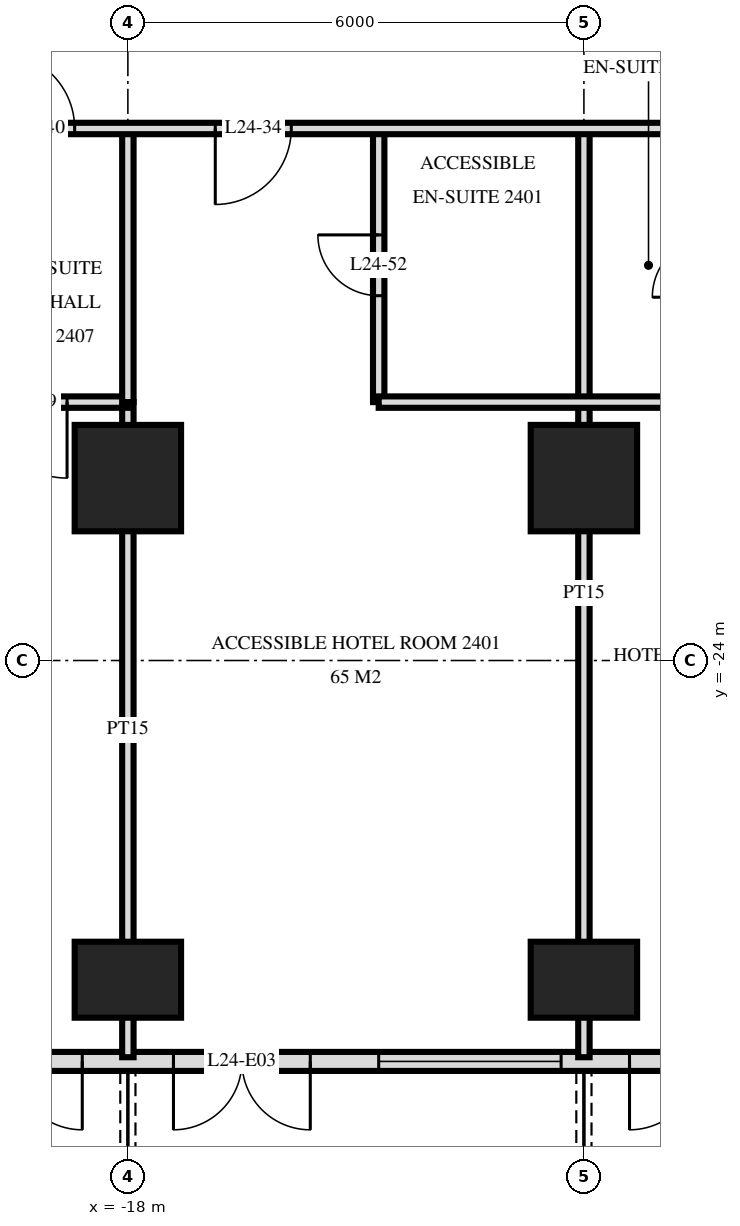
"""IFC4 building model, lengths in metres.
Left out: names, types, materials, properties, quantities, classifications, styles, units other than length and angle.
Written with IfcOpenShell. Run it as: python <this file> out.ifc"""

import sys

from ifc_helpers import new_model, si_unit, direction, frame, frame_2d, origin, origin_2d, place, context, subcontext, project, spatial, rectangle, extrude, element, fill, save


model = new_model("IFC4")
c1 = context("Model", 3, precision=1e-05, world=origin(), true_north=direction((0.0, 1.0)))
c2 = subcontext(c1, "Body", "Model", "MODEL_VIEW")
j1 = project(units=[si_unit("LENGTHUNIT", "METRE"), si_unit("PLANEANGLEUNIT", "RADIAN")], contexts=[c1])
p1 = place(None, origin())
s1 = spatial("IfcSite", under=j1, at=p1, CompositionType="ELEMENT")
p2 = place(p1, origin())
s2 = spatial("IfcBuilding", under=s1, at=p2, CompositionType="ELEMENT")
p3 = place(p2, frame((0.0, 0.0, 96.0)))
s3 = spatial("IfcBuildingStorey", under=s2, at=p3, CompositionType="ELEMENT", Elevation=96.0)
p4 = place(p3, frame((-18.0, -28.2, 0.0), z_axis=(0.0, 0.0, 1.0), x_axis=(1.0, 0.0, 0.0)))
e1 = element("IfcColumn", 1, at=p4, inside=s3, PredefinedType="COLUMN", context=c2, shape_type="SweptSolid", body=[
    extrude(rectangle(XDim=1.4, YDim=1.0, at=origin_2d()), origin(), (0.0, 0.0, 1.0), 3.6),
])
p5 = place(p3, frame((-18.0, -21.6, 0.0), z_axis=(0.0, 0.0, 1.0), x_axis=(1.0, 0.0, 0.0)))
e2 = element("IfcColumn", 2, at=p5, inside=s3, PredefinedType="COLUMN", context=c2, shape_type="SweptSolid", body=[
    extrude(rectangle(XDim=1.4, YDim=1.4, at=origin_2d()), origin(), (0.0, 0.0, 1.0), 3.6),
])
p6 = place(p3, frame((-12.0, -28.2, 0.0), z_axis=(0.0, 0.0, 1.0), x_axis=(1.0, 0.0, 0.0)))
e3 = element("IfcColumn", 3, at=p6, inside=s3, PredefinedType="COLUMN", context=c2, shape_type="SweptSolid", body=[
    extrude(rectangle(XDim=1.4, YDim=1.0, at=origin_2d()), origin(), (0.0, 0.0, 1.0), 3.6),
])
p7 = place(p3, frame((-12.0, -21.6, 0.0), z_axis=(0.0, 0.0, 1.0), x_axis=(1.0, 0.0, 0.0)))
e4 = element("IfcColumn", 4, at=p7, inside=s3, PredefinedType="COLUMN", context=c2, shape_type="SweptSolid", body=[
    extrude(rectangle(XDim=1.4, YDim=1.4, at=origin_2d()), origin(), (0.0, 0.0, 1.0), 3.6),
])
p8 = place(p3, frame((-28.775, -29.275, 0.0), z_axis=(0.0, 0.0, 1.0), x_axis=(1.0, 0.0, 0.0)))
e5 = element("IfcWall", 5, at=p8, inside=s3, PredefinedType="SOLIDWALL", context=c2, shape_type="SweptSolid", body=[
    extrude(rectangle(XDim=57.551, YDim=0.25, at=frame_2d((28.775, 0.0))), origin(), (0.0, 0.0, 1.0), 3.32),
])
p9 = place(p8, frame((0.575, 0.0, 0.0)))
e6 = element("IfcOpeningElement", 6, at=p9, cuts=e5, PredefinedType="OPENING", context=c2, shape_type="SweptSolid", body=[
    extrude(rectangle(XDim=1.8, YDim=2.4, at=frame_2d((0.9, 1.2))), frame((0.0, 0.135, 0.0), z_axis=(0.0, -1.0, 0.0), x_axis=(1.0, 0.0, 0.0)), (0.0, 0.0, 1.0), 0.27),
])
p10 = place(p8, frame((5.075, 0.0, 0.3)))
e7 = element("IfcOpeningElement", 7, at=p10, cuts=e5, PredefinedType="OPENING", context=c2, shape_type="SweptSolid", body=[
    extrude(rectangle(XDim=2.4, YDim=2.1, at=frame_2d((1.2, 1.05))), frame((0.0, 0.135, 0.0), z_axis=(0.0, -1.0, 0.0), x_axis=(1.0, 0.0, 0.0)), (0.0, 0.0, 1.0), 0.27),
])
p11 = place(p8, frame((8.375, 0.0, 0.0)))
e8 = element("IfcOpeningElement", 8, at=p11, cuts=e5, PredefinedType="OPENING", context=c2, shape_type="SweptSolid", body=[
    extrude(rectangle(XDim=1.8, YDim=2.4, at=frame_2d((0.9, 1.2))), frame((0.0, 0.135, 0.0), z_axis=(0.0, -1.0, 0.0), x_axis=(1.0, 0.0, 0.0)), (0.0, 0.0, 1.0), 0.27),
])
p12 = place(p8, frame((11.375, 0.0, 0.0)))
e9 = element("IfcOpeningElement", 9, at=p12, cuts=e5, PredefinedType="OPENING", context=c2, shape_type="SweptSolid", body=[
    extrude(rectangle(XDim=1.8, YDim=2.4, at=frame_2d((0.9, 1.2))), frame((0.0, 0.135, 0.0), z_axis=(0.0, -1.0, 0.0), x_axis=(1.0, 0.0, 0.0)), (0.0, 0.0, 1.0), 0.27),
])
p13 = place(p8, frame((14.075, 0.0, 0.3)))
e10 = element("IfcOpeningElement", 10, at=p13, cuts=e5, PredefinedType="OPENING", context=c2, shape_type="SweptSolid", body=[
    extrude(rectangle(XDim=2.4, YDim=2.1, at=frame_2d((1.2, 1.05))), frame((0.0, 0.135, 0.0), z_axis=(0.0, -1.0, 0.0), x_axis=(1.0, 0.0, 0.0)), (0.0, 0.0, 1.0), 0.27),
])
p14 = place(p8, frame((17.375, 0.0, 0.0)))
e11 = element("IfcOpeningElement", 11, at=p14, cuts=e5, PredefinedType="OPENING", context=c2, shape_type="SweptSolid", body=[
    extrude(rectangle(XDim=1.8, YDim=2.4, at=frame_2d((0.9, 1.2))), frame((0.0, 0.135, 0.0), z_axis=(0.0, -1.0, 0.0), x_axis=(1.0, 0.0, 0.0)), (0.0, 0.0, 1.0), 0.27),
])
p15 = place(p8, frame((20.075, 0.0, 0.3)))
e12 = element("IfcOpeningElement", 12, at=p15, cuts=e5, PredefinedType="OPENING", context=c2, shape_type="SweptSolid", body=[
    extrude(rectangle(XDim=2.4, YDim=2.1, at=frame_2d((1.2, 1.05))), frame((0.0, 0.135, 0.0), z_axis=(0.0, -1.0, 0.0), x_axis=(1.0, 0.0, 0.0)), (0.0, 0.0, 1.0), 0.27),
])
p16 = place(p8, frame((23.075, 0.0, 0.3)))
e13 = element("IfcOpeningElement", 13, at=p16, cuts=e5, PredefinedType="OPENING", context=c2, shape_type="SweptSolid", body=[
    extrude(rectangle(XDim=2.4, YDim=2.1, at=frame_2d((1.2, 1.05))), frame((0.0, 0.135, 0.0), z_axis=(0.0, -1.0, 0.0), x_axis=(1.0, 0.0, 0.0)), (0.0, 0.0, 1.0), 0.27),
])
p17 = place(p8, frame((26.375, 0.0, 0.0)))
e14 = element("IfcOpeningElement", 14, at=p17, cuts=e5, PredefinedType="OPENING", context=c2, shape_type="SweptSolid", body=[
    extrude(rectangle(XDim=1.8, YDim=2.4, at=frame_2d((0.9, 1.2))), frame((0.0, 0.135, 0.0), z_axis=(0.0, -1.0, 0.0), x_axis=(1.0, 0.0, 0.0)), (0.0, 0.0, 1.0), 0.27),
])
p18 = place(p8, frame((29.375, 0.0, 0.0)))
e15 = element("IfcOpeningElement", 15, at=p18, cuts=e5, PredefinedType="OPENING", context=c2, shape_type="SweptSolid", body=[
    extrude(rectangle(XDim=1.8, YDim=2.4, at=frame_2d((0.9, 1.2))), frame((0.0, 0.135, 0.0), z_axis=(0.0, -1.0, 0.0), x_axis=(1.0, 0.0, 0.0)), (0.0, 0.0, 1.0), 0.27),
])
p19 = place(p8, frame((32.075, 0.0, 0.3)))
e16 = element("IfcOpeningElement", 16, at=p19, cuts=e5, PredefinedType="OPENING", context=c2, shape_type="SweptSolid", body=[
    extrude(rectangle(XDim=2.4, YDim=2.1, at=frame_2d((1.2, 1.05))), frame((0.0, 0.135, 0.0), z_axis=(0.0, -1.0, 0.0), x_axis=(1.0, 0.0, 0.0)), (0.0, 0.0, 1.0), 0.27),
])
p20 = place(p8, frame((35.375, 0.0, 0.0)))
e17 = element("IfcOpeningElement", 17, at=p20, cuts=e5, PredefinedType="OPENING", context=c2, shape_type="SweptSolid", body=[
    extrude(rectangle(XDim=1.8, YDim=2.4, at=frame_2d((0.9, 1.2))), frame((0.0, 0.135, 0.0), z_axis=(0.0, -1.0, 0.0), x_axis=(1.0, 0.0, 0.0)), (0.0, 0.0, 1.0), 0.27),
])
p21 = place(p8, frame((38.075, 0.0, 0.3)))
e18 = element("IfcOpeningElement", 18, at=p21, cuts=e5, PredefinedType="OPENING", context=c2, shape_type="SweptSolid", body=[
    extrude(rectangle(XDim=2.4, YDim=2.1, at=frame_2d((1.2, 1.05))), frame((0.0, 0.135, 0.0), z_axis=(0.0, -1.0, 0.0), x_axis=(1.0, 0.0, 0.0)), (0.0, 0.0, 1.0), 0.27),
])
p22 = place(p8, frame((41.075, 0.0, 0.3)))
e19 = element("IfcOpeningElement", 19, at=p22, cuts=e5, PredefinedType="OPENING", context=c2, shape_type="SweptSolid", body=[
    extrude(rectangle(XDim=2.4, YDim=2.1, at=frame_2d((1.2, 1.05))), frame((0.0, 0.135, 0.0), z_axis=(0.0, -1.0, 0.0), x_axis=(1.0, 0.0, 0.0)), (0.0, 0.0, 1.0), 0.27),
])
p23 = place(p8, frame((44.375, 0.0, 0.0)))
e20 = element("IfcOpeningElement", 20, at=p23, cuts=e5, PredefinedType="OPENING", context=c2, shape_type="SweptSolid", body=[
    extrude(rectangle(XDim=1.8, YDim=2.4, at=frame_2d((0.9, 1.2))), frame((0.0, 0.135, 0.0), z_axis=(0.0, -1.0, 0.0), x_axis=(1.0, 0.0, 0.0)), (0.0, 0.0, 1.0), 0.27),
])
p24 = place(p8, frame((47.075, 0.0, 0.3)))
e21 = element("IfcOpeningElement", 21, at=p24, cuts=e5, PredefinedType="OPENING", context=c2, shape_type="SweptSolid", body=[
    extrude(rectangle(XDim=2.4, YDim=2.1, at=frame_2d((1.2, 1.05))), frame((0.0, 0.135, 0.0), z_axis=(0.0, -1.0, 0.0), x_axis=(1.0, 0.0, 0.0)), (0.0, 0.0, 1.0), 0.27),
])
p25 = place(p8, frame((50.375, 0.0, 0.0)))
e22 = element("IfcOpeningElement", 22, at=p25, cuts=e5, PredefinedType="OPENING", context=c2, shape_type="SweptSolid", body=[
    extrude(rectangle(XDim=1.8, YDim=2.4, at=frame_2d((0.9, 1.2))), frame((0.0, 0.135, 0.0), z_axis=(0.0, -1.0, 0.0), x_axis=(1.0, 0.0, 0.0)), (0.0, 0.0, 1.0), 0.27),
])
p26 = place(p8, frame((53.375, 0.0, 0.0)))
e23 = element("IfcOpeningElement", 23, at=p26, cuts=e5, PredefinedType="OPENING", context=c2, shape_type="SweptSolid", body=[
    extrude(rectangle(XDim=1.8, YDim=2.4, at=frame_2d((0.9, 1.2))), frame((0.0, 0.135, 0.0), z_axis=(0.0, -1.0, 0.0), x_axis=(1.0, 0.0, 0.0)), (0.0, 0.0, 1.0), 0.27),
])
p27 = place(p3, frame((-12.0, -29.22, 0.0), z_axis=(0.0, 0.0, 1.0), x_axis=(0.0, 1.0, 0.0)))
e24 = element("IfcWall", 24, at=p27, inside=s3, PredefinedType="PARTITIONING", context=c2, shape_type="SweptSolid", body=[
    extrude(rectangle(XDim=12.22, YDim=0.15, at=frame_2d((6.11, 0.0))), origin(), (0.0, 0.0, 1.0), 3.32),
])
p28 = place(p3, frame((-14.7, -20.6, 0.0), z_axis=(0.0, 0.0, 1.0), x_axis=(0.0, 1.0, 0.0)))
e25 = element("IfcWall", 25, at=p28, inside=s3, PredefinedType="PARTITIONING", context=c2, shape_type="SweptSolid", body=[
    extrude(rectangle(XDim=3.6, YDim=0.15, at=frame_2d((1.8, 0.0))), origin(), (0.0, 0.0, 1.0), 3.32),
])
p29 = place(p28, frame((1.4, 0.0, 0.0)))
e26 = element("IfcOpeningElement", 26, at=p29, cuts=e25, PredefinedType="OPENING", context=c2, shape_type="SweptSolid", body=[
    extrude(rectangle(XDim=0.8, YDim=2.1, at=frame_2d((0.4, 1.05))), frame((0.0, 0.085, 0.0), z_axis=(0.0, -1.0, 0.0), x_axis=(1.0, 0.0, 0.0)), (0.0, 0.0, 1.0), 0.17),
])
p30 = place(p3, frame((-18.0, -20.6, 0.0), z_axis=(0.0, 0.0, 1.0), x_axis=(0.0, 1.0, 0.0)))
e27 = element("IfcWall", 27, at=p30, inside=s3, PredefinedType="PARTITIONING", context=c2, shape_type="SweptSolid", body=[
    extrude(rectangle(XDim=3.6, YDim=0.15, at=frame_2d((1.8, 0.0))), origin(), (0.0, 0.0, 1.0), 3.32),
])
p31 = place(p3, frame((-18.0, -29.22, 0.0), z_axis=(0.0, 0.0, 1.0), x_axis=(0.0, 1.0, 0.0)))
e28 = element("IfcWall", 28, at=p31, inside=s3, PredefinedType="PARTITIONING", context=c2, shape_type="SweptSolid", body=[
    extrude(rectangle(XDim=8.62, YDim=0.15, at=frame_2d((4.31, 0.0))), origin(), (0.0, 0.0, 1.0), 3.32),
])
p32 = place(p3, frame((-20.4, -20.6, 0.0), z_axis=(0.0, 0.0, 1.0), x_axis=(1.0, 0.0, 0.0)))
e29 = element("IfcWall", 29, at=p32, inside=s3, PredefinedType="PARTITIONING", context=c2, shape_type="SweptSolid", body=[
    extrude(rectangle(XDim=2.4, YDim=0.15, at=frame_2d((1.2, 0.0))), origin(), (0.0, 0.0, 1.0), 3.32),
])
p33 = place(p32, frame((0.6, 0.0, 0.0)))
e30 = element("IfcOpeningElement", 30, at=p33, cuts=e29, PredefinedType="OPENING", context=c2, shape_type="SweptSolid", body=[
    extrude(rectangle(XDim=1.0, YDim=2.1, at=frame_2d((0.5, 1.05))), frame((0.0, 0.085, 0.0), z_axis=(0.0, -1.0, 0.0), x_axis=(1.0, 0.0, 0.0)), (0.0, 0.0, 1.0), 0.17),
])
p34 = place(p3, frame((-14.7, -20.6, 0.0), z_axis=(0.0, 0.0, 1.0), x_axis=(1.0, 0.0, 0.0)))
e31 = element("IfcWall", 31, at=p34, inside=s3, PredefinedType="PARTITIONING", context=c2, shape_type="SweptSolid", body=[
    extrude(rectangle(XDim=4.4, YDim=0.15, at=frame_2d((2.2, 0.0))), origin(), (0.0, 0.0, 1.0), 3.32),
])
p35 = place(p3, frame((-33.12, -17.0, 0.0), z_axis=(0.0, 0.0, 1.0), x_axis=(1.0, 0.0, 0.0)))
e32 = element("IfcWall", 32, at=p35, inside=s3, PredefinedType="PARTITIONING", context=c2, shape_type="SweptSolid", body=[
    extrude(rectangle(XDim=66.24, YDim=0.15, at=frame_2d((33.12, 0.0))), origin(), (0.0, 0.0, 1.0), 3.32),
])
p36 = place(p35, frame((16.27, 0.0, 0.0)))
e33 = element("IfcOpeningElement", 33, at=p36, cuts=e32, PredefinedType="OPENING", context=c2, shape_type="SweptSolid", body=[
    extrude(rectangle(XDim=1.0, YDim=2.1, at=frame_2d((0.5, 1.05))), frame((0.0, 0.085, 0.0), z_axis=(0.0, -1.0, 0.0), x_axis=(1.0, 0.0, 0.0)), (0.0, 0.0, 1.0), 0.17),
])
p37 = place(p35, frame((22.97, 0.0, 0.0)))
e34 = element("IfcOpeningElement", 34, at=p37, cuts=e32, PredefinedType="OPENING", context=c2, shape_type="SweptSolid", body=[
    extrude(rectangle(XDim=1.0, YDim=2.1, at=frame_2d((0.5, 1.05))), frame((0.0, 0.085, 0.0), z_axis=(0.0, -1.0, 0.0), x_axis=(1.0, 0.0, 0.0)), (0.0, 0.0, 1.0), 0.17),
])
p38 = place(p35, frame((34.42, 0.0, 0.0)))
e35 = element("IfcOpeningElement", 35, at=p38, cuts=e32, PredefinedType="OPENING", context=c2, shape_type="SweptSolid", body=[
    extrude(rectangle(XDim=1.0, YDim=2.1, at=frame_2d((0.5, 1.05))), frame((0.0, 0.085, 0.0), z_axis=(0.0, -1.0, 0.0), x_axis=(1.0, 0.0, 0.0)), (0.0, 0.0, 1.0), 0.17),
])
p39 = place(p35, frame((39.22, 0.0, 0.0)))
e36 = element("IfcOpeningElement", 36, at=p39, cuts=e32, PredefinedType="OPENING", context=c2, shape_type="SweptSolid", body=[
    extrude(rectangle(XDim=1.0, YDim=2.1, at=frame_2d((0.5, 1.05))), frame((0.0, 0.085, 0.0), z_axis=(0.0, -1.0, 0.0), x_axis=(1.0, 0.0, 0.0)), (0.0, 0.0, 1.0), 0.17),
])
p40 = place(p35, frame((42.27, 0.0, 0.0)))
e37 = element("IfcOpeningElement", 37, at=p40, cuts=e32, PredefinedType="OPENING", context=c2, shape_type="SweptSolid", body=[
    extrude(rectangle(XDim=1.0, YDim=2.1, at=frame_2d((0.5, 1.05))), frame((0.0, 0.085, 0.0), z_axis=(0.0, -1.0, 0.0), x_axis=(1.0, 0.0, 0.0)), (0.0, 0.0, 1.0), 0.17),
])
p41 = place(p35, frame((45.82, 0.0, 0.0)))
e38 = element("IfcOpeningElement", 38, at=p41, cuts=e32, PredefinedType="OPENING", context=c2, shape_type="SweptSolid", body=[
    extrude(rectangle(XDim=1.0, YDim=2.1, at=frame_2d((0.5, 1.05))), frame((0.0, 0.085, 0.0), z_axis=(0.0, -1.0, 0.0), x_axis=(1.0, 0.0, 0.0)), (0.0, 0.0, 1.0), 0.17),
])
p42 = place(p35, frame((13.42, 0.0, 0.0)))
e39 = element("IfcOpeningElement", 39, at=p42, cuts=e32, PredefinedType="OPENING", context=c2, shape_type="SweptSolid", body=[
    extrude(rectangle(XDim=1.0, YDim=2.1, at=frame_2d((0.5, 1.05))), frame((0.0, 0.085, 0.0), z_axis=(0.0, -1.0, 0.0), x_axis=(1.0, 0.0, 0.0)), (0.0, 0.0, 1.0), 0.17),
])
p43 = place(p35, frame((54.82, 0.0, 0.0)))
e40 = element("IfcOpeningElement", 40, at=p43, cuts=e32, PredefinedType="OPENING", context=c2, shape_type="SweptSolid", body=[
    extrude(rectangle(XDim=1.0, YDim=2.1, at=frame_2d((0.5, 1.05))), frame((0.0, 0.085, 0.0), z_axis=(0.0, -1.0, 0.0), x_axis=(1.0, 0.0, 0.0)), (0.0, 0.0, 1.0), 0.17),
])
p44 = place(p11, frame((0.9, 0.0, 0.0), z_axis=(0.0, 0.0, 1.0), x_axis=(-1.0, 0.0, 0.0)))
e41 = element("IfcDoor", 41, at=p44, inside=s3, OperationType="DOUBLE_DOOR_SINGLE_SWING", PredefinedType="DOOR", context=c2, shape_type="SweptSolid", body=[
    extrude(rectangle(XDim=1.8, YDim=2.4, at=frame_2d((0.0, 1.2))), frame((0.0, -0.025, 0.0), z_axis=(0.0, 1.0, 0.0), x_axis=(-1.0, 0.0, 0.0)), (0.0, 0.0, 1.0), 0.05),
])
fill(e8, e41)
p45 = place(p12, frame((0.9, 0.0, 0.0), z_axis=(0.0, 0.0, 1.0), x_axis=(-1.0, 0.0, 0.0)))
e42 = element("IfcDoor", 42, at=p45, inside=s3, OperationType="DOUBLE_DOOR_SINGLE_SWING", PredefinedType="DOOR", context=c2, shape_type="SweptSolid", body=[
    extrude(rectangle(XDim=1.8, YDim=2.4, at=frame_2d((0.0, 1.2))), frame((0.0, -0.025, 0.0), z_axis=(0.0, 1.0, 0.0), x_axis=(-1.0, 0.0, 0.0)), (0.0, 0.0, 1.0), 0.05),
])
fill(e9, e42)
p46 = place(p13, origin())
e43 = element("IfcWindow", 43, at=p46, inside=s3, PartitioningType="SINGLE_PANEL", PredefinedType="WINDOW", context=c2, shape_type="SweptSolid", body=[
    extrude(rectangle(XDim=2.4, YDim=2.1, at=frame_2d((1.2, 1.05))), frame((0.0, 0.03, 0.0), z_axis=(0.0, -1.0, 0.0), x_axis=(1.0, 0.0, 0.0)), (0.0, 0.0, 1.0), 0.06),
])
fill(e10, e43)
p47 = place(p14, frame((0.9, 0.0, 0.0), z_axis=(0.0, 0.0, 1.0), x_axis=(-1.0, 0.0, 0.0)))
e44 = element("IfcDoor", 44, at=p47, inside=s3, OperationType="DOUBLE_DOOR_SINGLE_SWING", PredefinedType="DOOR", context=c2, shape_type="SweptSolid", body=[
    extrude(rectangle(XDim=1.8, YDim=2.4, at=frame_2d((0.0, 1.2))), frame((0.0, -0.025, 0.0), z_axis=(0.0, 1.0, 0.0), x_axis=(-1.0, 0.0, 0.0)), (0.0, 0.0, 1.0), 0.05),
])
fill(e11, e44)
p48 = place(p36, frame((0.5, 0.0, 0.0), z_axis=(0.0, 0.0, 1.0), x_axis=(-1.0, 0.0, 0.0)))
e45 = element("IfcDoor", 45, at=p48, inside=s3, OperationType="SINGLE_SWING_LEFT", PredefinedType="DOOR", context=c2, shape_type="SweptSolid", body=[
    extrude(rectangle(XDim=1.0, YDim=2.1, at=frame_2d((0.0, 1.05))), frame((0.0, -0.025, 0.0), z_axis=(0.0, 1.0, 0.0), x_axis=(-1.0, 0.0, 0.0)), (0.0, 0.0, 1.0), 0.05),
])
fill(e33, e45)
p49 = place(p42, origin())
e46 = element("IfcDoor", 46, at=p49, inside=s3, OperationType="SINGLE_SWING_RIGHT", PredefinedType="DOOR", context=c2, shape_type="SweptSolid", body=[
    extrude(rectangle(XDim=1.0, YDim=2.1, at=frame_2d((0.5, 1.05))), frame((0.0, 0.025, 0.0), z_axis=(0.0, -1.0, 0.0), x_axis=(1.0, 0.0, 0.0)), (0.0, 0.0, 1.0), 0.05),
])
fill(e39, e46)
p50 = place(p29, origin())
e47 = element("IfcDoor", 47, at=p50, inside=s3, OperationType="SINGLE_SWING_LEFT", PredefinedType="DOOR", context=c2, shape_type="SweptSolid", body=[
    extrude(rectangle(XDim=0.8, YDim=2.1, at=frame_2d((0.4, 1.05))), frame((0.0, 0.025, 0.0), z_axis=(0.0, -1.0, 0.0), x_axis=(1.0, 0.0, 0.0)), (0.0, 0.0, 1.0), 0.05),
])
fill(e26, e47)
p51 = place(p33, frame((0.5, 0.0, 0.0), z_axis=(0.0, 0.0, 1.0), x_axis=(-1.0, 0.0, 0.0)))
e48 = element("IfcDoor", 48, at=p51, inside=s3, OperationType="SINGLE_SWING_RIGHT", PredefinedType="DOOR", context=c2, shape_type="SweptSolid", body=[
    extrude(rectangle(XDim=1.0, YDim=2.1, at=frame_2d((0.0, 1.05))), frame((0.0, -0.025, 0.0), z_axis=(0.0, 1.0, 0.0), x_axis=(-1.0, 0.0, 0.0)), (0.0, 0.0, 1.0), 0.05),
])
fill(e30, e48)
save(model, sys.argv[1])
